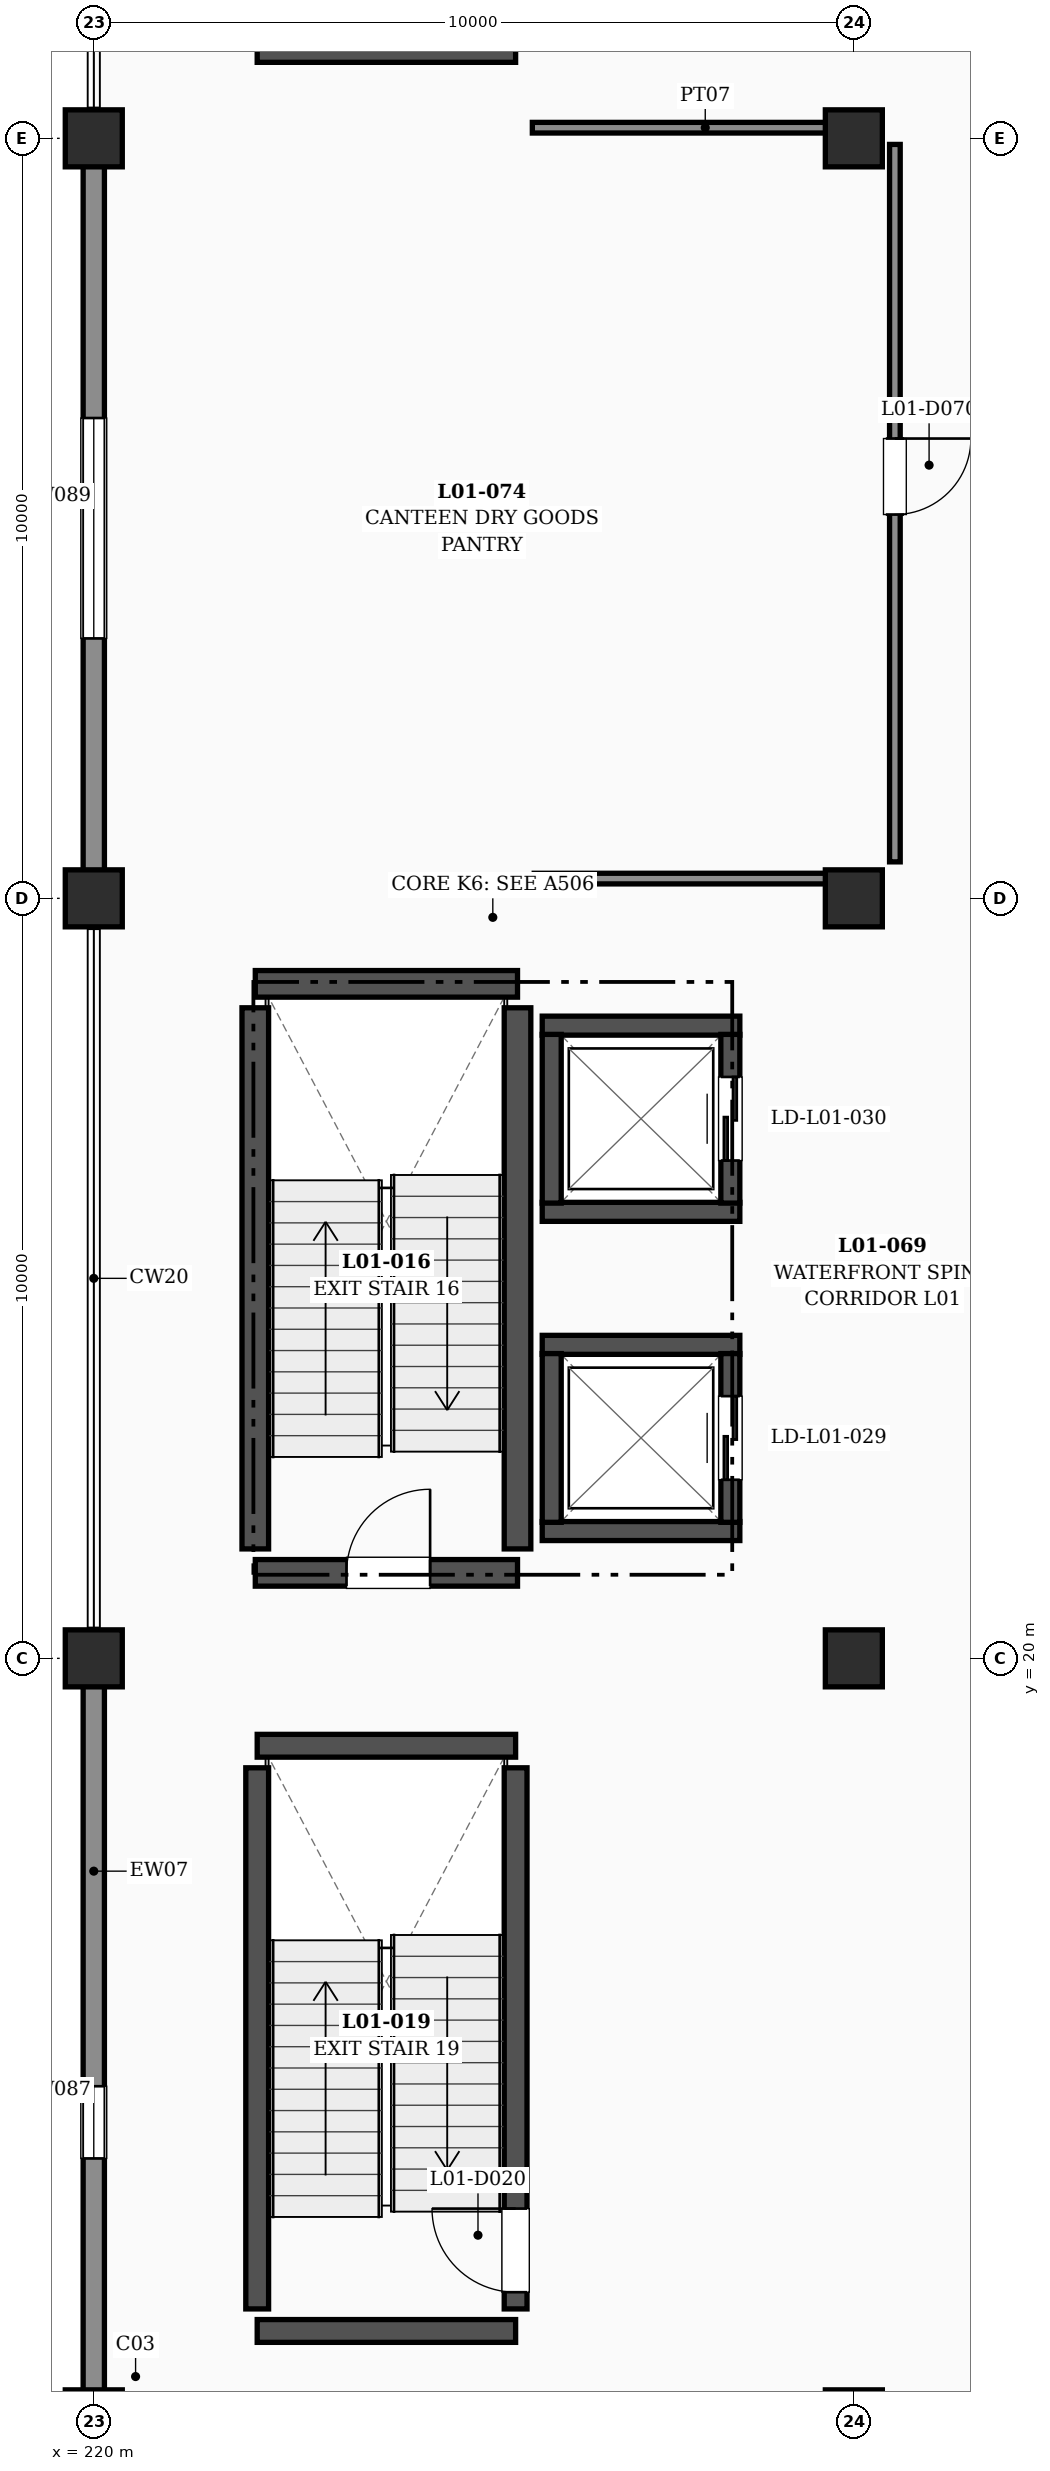
"""IFC4 building model, lengths in metres.
Left out: names, types, materials, properties, quantities, classifications, styles, units other than length and angle.
Written with IfcOpenShell. Run it as: python <this file> out.ifc"""

import sys

from ifc_helpers import new_model, si_unit, direction, frame, frame_2d, origin, origin_2d, place, context, subcontext, project, spatial, rectangle, extrude, element, fill, save


model = new_model("IFC4")
c1 = context("Model", 3, precision=1e-05, world=origin(), true_north=direction((0.0, 1.0)))
c2 = subcontext(c1, "Body", "Model", "MODEL_VIEW")
j1 = project(units=[si_unit("LENGTHUNIT", "METRE"), si_unit("PLANEANGLEUNIT", "RADIAN")], contexts=[c1])
p1 = place(None, origin())
s1 = spatial("IfcSite", under=j1, at=p1, CompositionType="ELEMENT")
p2 = place(p1, origin())
s2 = spatial("IfcBuilding", under=s1, at=p2, CompositionType="ELEMENT")
p3 = place(p2, frame((0.0, 0.0, 6.0)))
s3 = spatial("IfcBuildingStorey", under=s2, at=p3, CompositionType="ELEMENT", Elevation=6.0)
for number, where, z_axis, x_axis in (
    (1, (220.0, 10.0, 0.0), (0.0, 0.0, 1.0), (1.0, 0.0, 0.0)),
    (2, (220.0, 20.0, 0.0), (0.0, 0.0, 1.0), (1.0, 0.0, 0.0)),
    (3, (220.0, 30.0, 0.0), (0.0, 0.0, 1.0), (1.0, 0.0, 0.0)),
    (4, (220.0, 40.0, 0.0), (0.0, 0.0, 1.0), (1.0, 0.0, 0.0)),
    (5, (230.0, 10.0, 0.0), (0.0, 0.0, 1.0), (1.0, 0.0, 0.0)),
    (6, (230.0, 20.0, 0.0), (0.0, 0.0, 1.0), (1.0, 0.0, 0.0)),
    (7, (230.0, 30.0, 0.0), (0.0, 0.0, 1.0), (1.0, 0.0, 0.0)),
    (8, (230.0, 40.0, 0.0), (0.0, 0.0, 1.0), (1.0, 0.0, 0.0)),
):
    element("IfcColumn", number, at=place(p3, frame(where, z_axis=z_axis, x_axis=x_axis)), inside=s3, PredefinedType="COLUMN", context=c2, shape_type="SweptSolid", body=[
        extrude(rectangle(XDim=0.75, YDim=0.75, at=origin_2d()), origin(), (0.0, 0.0, 1.0), 4.8),
    ])
p4 = place(p3, frame((220.0, 10.22, 0.0), z_axis=(0.0, 0.0, 1.0), x_axis=(0.0, 1.0, 0.0)))
e9 = element("IfcWall", 9, at=p4, inside=s3, PredefinedType="SOLIDWALL", context=c2, shape_type="SweptSolid", body=[
    extrude(rectangle(XDim=9.56, YDim=0.28, at=frame_2d((4.78, 0.0))), origin(), (0.0, 0.0, 1.0), 3.76),
])
p5 = place(p4, frame((3.2, 0.0, 0.95)))
e10 = element("IfcOpeningElement", 10, at=p5, cuts=e9, PredefinedType="OPENING", context=c2, shape_type="SweptSolid", body=[
    extrude(rectangle(XDim=0.95, YDim=2.2, at=frame_2d((0.475, 1.1))), frame((0.0, 0.15, 0.0), z_axis=(0.0, -1.0, 0.0), x_axis=(1.0, 0.0, 0.0)), (0.0, 0.0, 1.0), 0.3),
])
p6 = place(p3, frame((220.0, 30.22, 0.0), z_axis=(0.0, 0.0, 1.0), x_axis=(0.0, 1.0, 0.0)))
e11 = element("IfcWall", 11, at=p6, inside=s3, PredefinedType="SOLIDWALL", context=c2, shape_type="SweptSolid", body=[
    extrude(rectangle(XDim=9.56, YDim=0.28, at=frame_2d((4.78, 0.0))), origin(), (0.0, 0.0, 1.0), 3.76),
])
p7 = place(p6, frame((3.2, 0.0, 0.95)))
e12 = element("IfcOpeningElement", 12, at=p7, cuts=e11, PredefinedType="OPENING", context=c2, shape_type="SweptSolid", body=[
    extrude(rectangle(XDim=2.9, YDim=2.2, at=frame_2d((1.45, 1.1))), frame((0.0, 0.15, 0.0), z_axis=(0.0, -1.0, 0.0), x_axis=(1.0, 0.0, 0.0)), (0.0, 0.0, 1.0), 0.3),
])
p8 = place(p3, frame((222.125, 21.125, 0.0), z_axis=(0.0, 0.0, 1.0), x_axis=(1.0, 0.0, 0.0)))
e13 = element("IfcWall", 13, at=p8, inside=s3, PredefinedType="SHEAR", context=c2, shape_type="SweptSolid", body=[
    extrude(rectangle(XDim=3.45, YDim=0.35, at=frame_2d((1.725, 0.0))), origin(), (0.0, 0.0, 1.0), 4.8),
])
p9 = place(p8, frame((1.2, 0.0, 0.0)))
e14 = element("IfcOpeningElement", 14, at=p9, cuts=e13, PredefinedType="OPENING", context=c2, shape_type="SweptSolid", body=[
    extrude(rectangle(XDim=1.1, YDim=2.2, at=frame_2d((0.55, 1.1))), frame((0.0, 0.185, 0.0), z_axis=(0.0, -1.0, 0.0), x_axis=(1.0, 0.0, 0.0)), (0.0, 0.0, 1.0), 0.37),
])
p10 = place(p3, frame((222.125, 28.875, 0.0), z_axis=(0.0, 0.0, 1.0), x_axis=(1.0, 0.0, 0.0)))
e15 = element("IfcWall", 15, at=p10, inside=s3, PredefinedType="SHEAR", context=c2, shape_type="SweptSolid", body=[
    extrude(rectangle(XDim=3.45, YDim=0.35, at=frame_2d((1.725, 0.0))), origin(), (0.0, 0.0, 1.0), 4.8),
])
for number, where, z_axis, x_axis in (
    (16, (222.125, 21.44, 0.0), (0.0, 0.0, 1.0), (0.0, 1.0, 0.0)),
    (17, (225.575, 21.44, 0.0), (0.0, 0.0, 1.0), (0.0, 1.0, 0.0)),
):
    element("IfcWall", number, at=place(p3, frame(where, z_axis=z_axis, x_axis=x_axis)), inside=s3, PredefinedType="SHEAR", context=c2, shape_type="SweptSolid", body=[
        extrude(rectangle(XDim=7.12, YDim=0.35, at=frame_2d((3.56, 0.0))), origin(), (0.0, 0.0, 1.0), 4.8),
    ])
for number, where, z_axis, x_axis in (
    (18, (222.15, 41.15, 0.0), (0.0, 0.0, 1.0), (1.0, 0.0, 0.0)),
    (19, (222.15, 11.15, 0.0), (0.0, 0.0, 1.0), (1.0, 0.0, 0.0)),
    (20, (222.15, 18.85, 0.0), (0.0, 0.0, 1.0), (1.0, 0.0, 0.0)),
):
    element("IfcWall", number, at=place(p3, frame(where, z_axis=z_axis, x_axis=x_axis)), inside=s3, PredefinedType="SHEAR", context=c2, shape_type="SweptSolid", body=[
        extrude(rectangle(XDim=3.4, YDim=0.3, at=frame_2d((1.7, 0.0))), origin(), (0.0, 0.0, 1.0), 4.8),
    ])
p11 = place(p3, frame((222.15, 11.44, 0.0), z_axis=(0.0, 0.0, 1.0), x_axis=(0.0, 1.0, 0.0)))
e21 = element("IfcWall", 21, at=p11, inside=s3, PredefinedType="SHEAR", context=c2, shape_type="SweptSolid", body=[
    extrude(rectangle(XDim=7.12, YDim=0.3, at=frame_2d((3.56, 0.0))), origin(), (0.0, 0.0, 1.0), 4.8),
])
p12 = place(p3, frame((225.55, 11.44, 0.0), z_axis=(0.0, 0.0, 1.0), x_axis=(0.0, 1.0, 0.0)))
e22 = element("IfcWall", 22, at=p12, inside=s3, PredefinedType="SHEAR", context=c2, shape_type="SweptSolid", body=[
    extrude(rectangle(XDim=7.12, YDim=0.3, at=frame_2d((3.56, 0.0))), origin(), (0.0, 0.0, 1.0), 4.8),
])
p13 = place(p12, frame((0.22, 0.0, 0.0)))
e23 = element("IfcOpeningElement", 23, at=p13, cuts=e22, PredefinedType="OPENING", context=c2, shape_type="SweptSolid", body=[
    extrude(rectangle(XDim=1.1, YDim=2.2, at=frame_2d((0.55, 1.1))), frame((0.0, 0.16, 0.0), z_axis=(0.0, -1.0, 0.0), x_axis=(1.0, 0.0, 0.0)), (0.0, 0.0, 1.0), 0.32),
])
for number, where, z_axis, x_axis in (
    (24, (225.9, 21.675, 0.0), (0.0, 0.0, 1.0), (1.0, 0.0, 0.0)),
    (25, (225.9, 24.125, 0.0), (0.0, 0.0, 1.0), (1.0, 0.0, 0.0)),
):
    element("IfcWall", number, at=place(p3, frame(where, z_axis=z_axis, x_axis=x_axis)), inside=s3, PredefinedType="SHEAR", context=c2, shape_type="SweptSolid", body=[
        extrude(rectangle(XDim=2.6, YDim=0.25, at=frame_2d((1.3, 0.0))), origin(), (0.0, 0.0, 1.0), 4.8),
    ])
p14 = place(p3, frame((226.025, 21.79, 0.0), z_axis=(0.0, 0.0, 1.0), x_axis=(0.0, 1.0, 0.0)))
e26 = element("IfcWall", 26, at=p14, inside=s3, PredefinedType="SHEAR", context=c2, shape_type="SweptSolid", body=[
    extrude(rectangle(XDim=2.22, YDim=0.25, at=frame_2d((1.11, 0.0))), origin(), (0.0, 0.0, 1.0), 4.8),
])
p15 = place(p3, frame((228.375, 21.79, 0.0), z_axis=(0.0, 0.0, 1.0), x_axis=(0.0, 1.0, 0.0)))
e27 = element("IfcWall", 27, at=p15, inside=s3, PredefinedType="SHEAR", context=c2, shape_type="SweptSolid", body=[
    extrude(rectangle(XDim=2.22, YDim=0.25, at=frame_2d((1.11, 0.0))), origin(), (0.0, 0.0, 1.0), 4.8),
])
p16 = place(p15, frame((0.56, 0.0, 0.0)))
e28 = element("IfcOpeningElement", 28, at=p16, cuts=e27, PredefinedType="OPENING", context=c2, shape_type="SweptSolid", body=[
    extrude(rectangle(XDim=1.1, YDim=2.2, at=frame_2d((0.55, 1.1))), frame((0.0, 0.135, 0.0), z_axis=(0.0, -1.0, 0.0), x_axis=(1.0, 0.0, 0.0)), (0.0, 0.0, 1.0), 0.27),
])
for number, where, z_axis, x_axis in (
    (29, (225.9, 25.875, 0.0), (0.0, 0.0, 1.0), (1.0, 0.0, 0.0)),
    (30, (225.9, 28.325, 0.0), (0.0, 0.0, 1.0), (1.0, 0.0, 0.0)),
):
    element("IfcWall", number, at=place(p3, frame(where, z_axis=z_axis, x_axis=x_axis)), inside=s3, PredefinedType="SHEAR", context=c2, shape_type="SweptSolid", body=[
        extrude(rectangle(XDim=2.6, YDim=0.25, at=frame_2d((1.3, 0.0))), origin(), (0.0, 0.0, 1.0), 4.8),
    ])
p17 = place(p3, frame((226.025, 25.99, 0.0), z_axis=(0.0, 0.0, 1.0), x_axis=(0.0, 1.0, 0.0)))
e31 = element("IfcWall", 31, at=p17, inside=s3, PredefinedType="SHEAR", context=c2, shape_type="SweptSolid", body=[
    extrude(rectangle(XDim=2.22, YDim=0.25, at=frame_2d((1.11, 0.0))), origin(), (0.0, 0.0, 1.0), 4.8),
])
p18 = place(p3, frame((228.375, 25.99, 0.0), z_axis=(0.0, 0.0, 1.0), x_axis=(0.0, 1.0, 0.0)))
e32 = element("IfcWall", 32, at=p18, inside=s3, PredefinedType="SHEAR", context=c2, shape_type="SweptSolid", body=[
    extrude(rectangle(XDim=2.22, YDim=0.25, at=frame_2d((1.11, 0.0))), origin(), (0.0, 0.0, 1.0), 4.8),
])
p19 = place(p18, frame((0.56, 0.0, 0.0)))
e33 = element("IfcOpeningElement", 33, at=p19, cuts=e32, PredefinedType="OPENING", context=c2, shape_type="SweptSolid", body=[
    extrude(rectangle(XDim=1.1, YDim=2.2, at=frame_2d((0.55, 1.1))), frame((0.0, 0.135, 0.0), z_axis=(0.0, -1.0, 0.0), x_axis=(1.0, 0.0, 0.0)), (0.0, 0.0, 1.0), 0.27),
])
p20 = place(p3, frame((225.77, 40.14, 0.0), z_axis=(0.0, 0.0, 1.0), x_axis=(1.0, 0.0, 0.0)))
e34 = element("IfcWall", 34, at=p20, inside=s3, PredefinedType="PARTITIONING", context=c2, shape_type="SweptSolid", body=[
    extrude(rectangle(XDim=4.55, YDim=0.14, at=frame_2d((2.275, 0.0))), origin(), (0.0, 0.0, 1.0), 3.71),
])
p21 = place(p3, frame((230.54, 39.92, 0.0), z_axis=(0.0, 0.0, 1.0), x_axis=(0.0, -1.0, 0.0)))
e35 = element("IfcWall", 35, at=p21, inside=s3, PredefinedType="PARTITIONING", context=c2, shape_type="SweptSolid", body=[
    extrude(rectangle(XDim=9.44, YDim=0.14, at=frame_2d((4.72, 0.0))), origin(), (0.0, 0.0, 1.0), 4.46),
])
p22 = place(p21, frame((3.87, 0.0, 0.0)))
e36 = element("IfcOpeningElement", 36, at=p22, cuts=e35, PredefinedType="OPENING", context=c2, shape_type="SweptSolid", body=[
    extrude(rectangle(XDim=1.0, YDim=2.2, at=frame_2d((0.5, 1.1))), frame((0.0, 0.08, 0.0), z_axis=(0.0, -1.0, 0.0), x_axis=(1.0, 0.0, 0.0)), (0.0, 0.0, 1.0), 0.16),
])
p23 = place(p3, frame((230.32, 30.26, 0.0), z_axis=(0.0, 0.0, 1.0), x_axis=(-1.0, 0.0, 0.0)))
e37 = element("IfcWall", 37, at=p23, inside=s3, PredefinedType="PARTITIONING", context=c2, shape_type="SweptSolid", body=[
    extrude(rectangle(XDim=4.525, YDim=0.14, at=frame_2d((2.263, 0.0))), origin(), (0.0, 0.0, 1.0), 3.71),
])
p24 = place(p5, origin())
e38 = element("IfcWindow", 38, at=p24, inside=s3, PartitioningType="SINGLE_PANEL", PredefinedType="WINDOW", context=c2, shape_type="SweptSolid", body=[
    extrude(rectangle(XDim=0.95, YDim=2.2, at=frame_2d((0.475, 1.1))), frame((0.0, 0.03, 0.0), z_axis=(0.0, -1.0, 0.0), x_axis=(1.0, 0.0, 0.0)), (0.0, 0.0, 1.0), 0.06),
])
fill(e10, e38)
p25 = place(p7, origin())
e39 = element("IfcWindow", 39, at=p25, inside=s3, PartitioningType="SINGLE_PANEL", PredefinedType="WINDOW", context=c2, shape_type="SweptSolid", body=[
    extrude(rectangle(XDim=2.9, YDim=2.2, at=frame_2d((1.45, 1.1))), frame((0.0, 0.03, 0.0), z_axis=(0.0, -1.0, 0.0), x_axis=(1.0, 0.0, 0.0)), (0.0, 0.0, 1.0), 0.06),
])
fill(e12, e39)
p26 = place(p9, origin())
e40 = element("IfcDoor", 40, at=p26, inside=s3, OperationType="SINGLE_SWING_RIGHT", PredefinedType="DOOR", context=c2, shape_type="SweptSolid", body=[
    extrude(rectangle(XDim=1.1, YDim=2.2, at=frame_2d((0.55, 1.1))), frame((0.0, 0.025, 0.0), z_axis=(0.0, -1.0, 0.0), x_axis=(1.0, 0.0, 0.0)), (0.0, 0.0, 1.0), 0.05),
])
fill(e14, e40)
p27 = place(p13, origin())
e41 = element("IfcDoor", 41, at=p27, inside=s3, OperationType="SINGLE_SWING_RIGHT", PredefinedType="DOOR", context=c2, shape_type="SweptSolid", body=[
    extrude(rectangle(XDim=1.1, YDim=2.2, at=frame_2d((0.55, 1.1))), frame((0.0, 0.025, 0.0), z_axis=(0.0, -1.0, 0.0), x_axis=(1.0, 0.0, 0.0)), (0.0, 0.0, 1.0), 0.05),
])
fill(e23, e41)
p28 = place(p16, origin())
e42 = element("IfcDoor", 42, at=p28, inside=s3, OperationType="DOUBLE_DOOR_SLIDING", PredefinedType="DOOR", context=c2, shape_type="SweptSolid", body=[
    extrude(rectangle(XDim=1.1, YDim=2.2, at=frame_2d((0.55, 1.1))), frame((0.0, 0.025, 0.0), z_axis=(0.0, -1.0, 0.0), x_axis=(1.0, 0.0, 0.0)), (0.0, 0.0, 1.0), 0.05),
])
fill(e28, e42)
p29 = place(p19, origin())
e43 = element("IfcDoor", 43, at=p29, inside=s3, OperationType="DOUBLE_DOOR_SLIDING", PredefinedType="DOOR", context=c2, shape_type="SweptSolid", body=[
    extrude(rectangle(XDim=1.1, YDim=2.2, at=frame_2d((0.55, 1.1))), frame((0.0, 0.025, 0.0), z_axis=(0.0, -1.0, 0.0), x_axis=(1.0, 0.0, 0.0)), (0.0, 0.0, 1.0), 0.05),
])
fill(e33, e43)
p30 = place(p22, origin())
e44 = element("IfcDoor", 44, at=p30, inside=s3, OperationType="SINGLE_SWING_LEFT", PredefinedType="DOOR", context=c2, shape_type="SweptSolid", body=[
    extrude(rectangle(XDim=1.0, YDim=2.2, at=frame_2d((0.5, 1.1))), frame((0.0, 0.025, 0.0), z_axis=(0.0, -1.0, 0.0), x_axis=(1.0, 0.0, 0.0)), (0.0, 0.0, 1.0), 0.05),
])
fill(e36, e44)
save(model, sys.argv[1])
